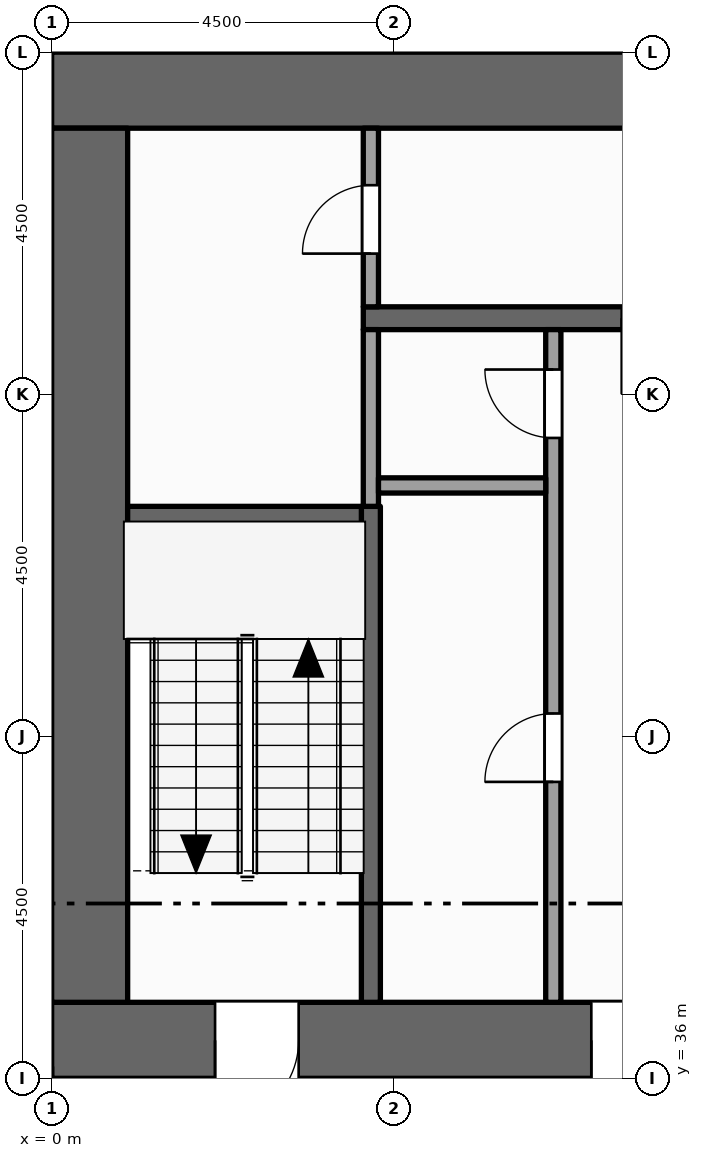
"""IFC4 building model, lengths in metres.
Left out: names, types, materials, properties, quantities, classifications, styles, units other than length and angle.
Written with IfcOpenShell. Run it as: python <this file> out.ifc"""

import sys

from ifc_helpers import new_model, si_unit, direction, frame, frame_2d, origin, place, context, subcontext, project, spatial, rectangle, extrude, element, fill, save


model = new_model("IFC4")
c1 = context("Model", 3, precision=1e-05, world=origin(), true_north=direction((0.0, 1.0)))
c2 = subcontext(c1, "Body", "Model", "MODEL_VIEW")
j1 = project(units=[si_unit("LENGTHUNIT", "METRE"), si_unit("PLANEANGLEUNIT", "RADIAN")], contexts=[c1])
p1 = place(None, origin())
s1 = spatial("IfcSite", under=j1, at=p1, CompositionType="ELEMENT")
p2 = place(p1, origin())
s2 = spatial("IfcBuilding", under=s1, at=p2, CompositionType="ELEMENT")
p3 = place(p2, frame((0.0, 0.0, 183.0)))
s3 = spatial("IfcBuildingStorey", under=s2, at=p3, CompositionType="ELEMENT", Elevation=183.0)
p4 = place(p3, frame((0.0, 36.5, -0.15), z_axis=(0.0, 0.0, 1.0), x_axis=(1.0, 0.0, 0.0)))
e1 = element("IfcWall", 1, at=p4, inside=s3, PredefinedType="SHEAR", context=c2, shape_type="SweptSolid", body=[
    extrude(rectangle(XDim=22.5, YDim=1.0, at=frame_2d((11.25, 0.0))), origin(), (0.0, 0.0, 1.0), 4.0),
])
p5 = place(p4, frame((7.1, 0.0, 0.15)))
e2 = element("IfcOpeningElement", 2, at=p5, cuts=e1, PredefinedType="OPENING", context=c2, shape_type="SweptSolid", body=[
    extrude(rectangle(XDim=1.8, YDim=2.1, at=frame_2d((0.9, 1.05))), frame((0.0, 0.51, 0.0), z_axis=(0.0, -1.0, 0.0), x_axis=(1.0, 0.0, 0.0)), (0.0, 0.0, 1.0), 1.02),
])
p6 = place(p4, frame((13.15, 0.0, 0.15)))
e3 = element("IfcOpeningElement", 3, at=p6, cuts=e1, PredefinedType="OPENING", context=c2, shape_type="SweptSolid", body=[
    extrude(rectangle(XDim=1.1, YDim=2.1, at=frame_2d((0.55, 1.05))), frame((0.0, 0.51, 0.0), z_axis=(0.0, -1.0, 0.0), x_axis=(1.0, 0.0, 0.0)), (0.0, 0.0, 1.0), 1.02),
])
p7 = place(p4, frame((2.15, 0.0, 0.15)))
e4 = element("IfcOpeningElement", 4, at=p7, cuts=e1, PredefinedType="OPENING", context=c2, shape_type="SweptSolid", body=[
    extrude(rectangle(XDim=1.1, YDim=2.1, at=frame_2d((0.55, 1.05))), frame((0.0, 0.51, 0.0), z_axis=(0.0, -1.0, 0.0), x_axis=(1.0, 0.0, 0.0)), (0.0, 0.0, 1.0), 1.02),
])
p8 = place(p4, frame((19.35, 0.0, 0.15)))
e5 = element("IfcOpeningElement", 5, at=p8, cuts=e1, PredefinedType="OPENING", context=c2, shape_type="SweptSolid", body=[
    extrude(rectangle(XDim=1.1, YDim=2.1, at=frame_2d((0.55, 1.05))), frame((0.0, 0.51, 0.0), z_axis=(0.0, -1.0, 0.0), x_axis=(1.0, 0.0, 0.0)), (0.0, 0.0, 1.0), 1.02),
])
p9 = place(p3, frame((0.0, 49.0, -0.15), z_axis=(0.0, 0.0, 1.0), x_axis=(1.0, 0.0, 0.0)))
e6 = element("IfcWall", 6, at=p9, inside=s3, PredefinedType="SHEAR", context=c2, shape_type="SweptSolid", body=[
    extrude(rectangle(XDim=22.5, YDim=1.0, at=frame_2d((11.25, 0.0))), origin(), (0.0, 0.0, 1.0), 4.0),
])
p10 = place(p3, frame((0.5, 37.0, -0.15), z_axis=(0.0, 0.0, 1.0), x_axis=(0.0, 1.0, 0.0)))
e7 = element("IfcWall", 7, at=p10, inside=s3, PredefinedType="SHEAR", context=c2, shape_type="SweptSolid", body=[
    extrude(rectangle(XDim=11.5, YDim=1.0, at=frame_2d((5.75, 0.0))), origin(), (0.0, 0.0, 1.0), 4.0),
])
p11 = place(p3, frame((0.0, 36.0, 0.0), z_axis=(0.0, 0.0, 1.0), x_axis=(-1.0, 0.0, 0.0)))
e8 = element("IfcWall", 8, at=p11, inside=s3, PredefinedType="STANDARD", context=c2, shape_type="SweptSolid", body=[
    extrude(rectangle(XDim=1.05, YDim=0.3, at=frame_2d((0.525, 0.0))), origin(), (0.0, 0.0, 1.0), 3.049),
])
p12 = place(p3, frame((4.2, 37.0, 0.0), z_axis=(0.0, 0.0, 1.0), x_axis=(0.0, 1.0, 0.0)))
e9 = element("IfcWall", 9, at=p12, inside=s3, PredefinedType="SHEAR", context=c2, shape_type="SweptSolid", body=[
    extrude(rectangle(XDim=6.525, YDim=0.25, at=frame_2d((3.262, 0.0))), origin(), (0.0, 0.0, 1.0), 3.75),
])
p13 = place(p3, frame((4.2, 43.525, 0.0), z_axis=(0.0, 0.0, 1.0), x_axis=(0.0, 1.0, 0.0)))
e10 = element("IfcWall", 10, at=p13, inside=s3, PredefinedType="PARTITIONING", context=c2, shape_type="SweptSolid", body=[
    extrude(rectangle(XDim=2.325, YDim=0.2, at=frame_2d((1.163, 0.0))), origin(), (0.0, 0.0, 1.0), 3.75),
])
p14 = place(p3, frame((4.2, 46.15, 0.0), z_axis=(0.0, 0.0, 1.0), x_axis=(0.0, 1.0, 0.0)))
e11 = element("IfcWall", 11, at=p14, inside=s3, PredefinedType="PARTITIONING", context=c2, shape_type="SweptSolid", body=[
    extrude(rectangle(XDim=2.35, YDim=0.2, at=frame_2d((1.175, 0.0))), origin(), (0.0, 0.0, 1.0), 3.75),
])
p15 = place(p14, frame((0.7, 0.0, 0.0)))
e12 = element("IfcOpeningElement", 12, at=p15, cuts=e11, PredefinedType="OPENING", context=c2, shape_type="SweptSolid", body=[
    extrude(rectangle(XDim=0.9, YDim=2.1, at=frame_2d((0.45, 1.05))), frame((0.0, 0.11, 0.0), z_axis=(0.0, -1.0, 0.0), x_axis=(1.0, 0.0, 0.0)), (0.0, 0.0, 1.0), 0.22),
])
p16 = place(p3, frame((6.6, 37.0, 0.0), z_axis=(0.0, 0.0, 1.0), x_axis=(0.0, 1.0, 0.0)))
e13 = element("IfcWall", 13, at=p16, inside=s3, PredefinedType="PARTITIONING", context=c2, shape_type="SweptSolid", body=[
    extrude(rectangle(XDim=8.85, YDim=0.2, at=frame_2d((4.425, 0.0))), origin(), (0.0, 0.0, 1.0), 3.75),
])
p17 = place(p16, frame((2.9, 0.0, 0.0)))
e14 = element("IfcOpeningElement", 14, at=p17, cuts=e13, PredefinedType="OPENING", context=c2, shape_type="SweptSolid", body=[
    extrude(rectangle(XDim=0.9, YDim=2.1, at=frame_2d((0.45, 1.05))), frame((0.0, 0.11, 0.0), z_axis=(0.0, -1.0, 0.0), x_axis=(1.0, 0.0, 0.0)), (0.0, 0.0, 1.0), 0.22),
])
p18 = place(p16, frame((7.425, 0.0, 0.0)))
e15 = element("IfcOpeningElement", 15, at=p18, cuts=e13, PredefinedType="OPENING", context=c2, shape_type="SweptSolid", body=[
    extrude(rectangle(XDim=0.9, YDim=2.1, at=frame_2d((0.45, 1.05))), frame((0.0, 0.11, 0.0), z_axis=(0.0, -1.0, 0.0), x_axis=(1.0, 0.0, 0.0)), (0.0, 0.0, 1.0), 0.22),
])
p19 = place(p3, frame((1.0, 43.4, 0.0), z_axis=(0.0, 0.0, 1.0), x_axis=(1.0, 0.0, 0.0)))
e16 = element("IfcWall", 16, at=p19, inside=s3, PredefinedType="SHEAR", context=c2, shape_type="SweptSolid", body=[
    extrude(rectangle(XDim=3.075, YDim=0.25, at=frame_2d((1.538, 0.0))), origin(), (0.0, 0.0, 1.0), 3.75),
])
p20 = place(p3, frame((4.3, 43.8, 0.0), z_axis=(0.0, 0.0, 1.0), x_axis=(1.0, 0.0, 0.0)))
e17 = element("IfcWall", 17, at=p20, inside=s3, PredefinedType="PARTITIONING", context=c2, shape_type="SweptSolid", body=[
    extrude(rectangle(XDim=2.2, YDim=0.2, at=frame_2d((1.1, 0.0))), origin(), (0.0, 0.0, 1.0), 3.75),
])
p21 = place(p3, frame((4.1, 46.0, 0.0), z_axis=(0.0, 0.0, 1.0), x_axis=(1.0, 0.0, 0.0)))
e18 = element("IfcWall", 18, at=p21, inside=s3, PredefinedType="SHEAR", context=c2, shape_type="SweptSolid", body=[
    extrude(rectangle(XDim=14.5, YDim=0.3, at=frame_2d((7.25, 0.0))), origin(), (0.0, 0.0, 1.0), 3.75),
])
p22 = place(p21, frame((3.4, 0.0, 0.0)))
e19 = element("IfcOpeningElement", 19, at=p22, cuts=e18, PredefinedType="OPENING", context=c2, shape_type="SweptSolid", body=[
    extrude(rectangle(XDim=1.0, YDim=2.1, at=frame_2d((0.5, 1.05))), frame((0.0, 0.16, 0.0), z_axis=(0.0, -1.0, 0.0), x_axis=(1.0, 0.0, 0.0)), (0.0, 0.0, 1.0), 0.32),
])
p23 = place(p21, frame((9.1, 0.0, 0.0)))
e20 = element("IfcOpeningElement", 20, at=p23, cuts=e18, PredefinedType="OPENING", context=c2, shape_type="SweptSolid", body=[
    extrude(rectangle(XDim=1.0, YDim=2.1, at=frame_2d((0.5, 1.05))), frame((0.0, 0.16, 0.0), z_axis=(0.0, -1.0, 0.0), x_axis=(1.0, 0.0, 0.0)), (0.0, 0.0, 1.0), 0.32),
])
p24 = place(p5, origin())
e21 = element("IfcDoor", 21, at=p24, inside=s3, OperationType="DOUBLE_DOOR_SINGLE_SWING", PredefinedType="DOOR", context=c2, shape_type="SweptSolid", body=[
    extrude(rectangle(XDim=1.8, YDim=2.1, at=frame_2d((0.9, 1.05))), frame((0.0, 0.025, 0.0), z_axis=(0.0, -1.0, 0.0), x_axis=(1.0, 0.0, 0.0)), (0.0, 0.0, 1.0), 0.05),
])
fill(e2, e21)
p25 = place(p7, origin())
e22 = element("IfcDoor", 22, at=p25, inside=s3, OperationType="SINGLE_SWING_LEFT", PredefinedType="DOOR", context=c2, shape_type="SweptSolid", body=[
    extrude(rectangle(XDim=1.1, YDim=2.1, at=frame_2d((0.55, 1.05))), frame((0.0, 0.025, 0.0), z_axis=(0.0, -1.0, 0.0), x_axis=(1.0, 0.0, 0.0)), (0.0, 0.0, 1.0), 0.05),
])
fill(e4, e22)
p26 = place(p15, origin())
e23 = element("IfcDoor", 23, at=p26, inside=s3, OperationType="SINGLE_SWING_LEFT", PredefinedType="DOOR", context=c2, shape_type="SweptSolid", body=[
    extrude(rectangle(XDim=0.9, YDim=2.1, at=frame_2d((0.45, 1.05))), frame((0.0, 0.025, 0.0), z_axis=(0.0, -1.0, 0.0), x_axis=(1.0, 0.0, 0.0)), (0.0, 0.0, 1.0), 0.05),
])
fill(e12, e23)
p27 = place(p17, origin())
e24 = element("IfcDoor", 24, at=p27, inside=s3, OperationType="SINGLE_SWING_LEFT", PredefinedType="DOOR", context=c2, shape_type="SweptSolid", body=[
    extrude(rectangle(XDim=0.9, YDim=2.1, at=frame_2d((0.45, 1.05))), frame((0.0, 0.025, 0.0), z_axis=(0.0, -1.0, 0.0), x_axis=(1.0, 0.0, 0.0)), (0.0, 0.0, 1.0), 0.05),
])
fill(e14, e24)
p28 = place(p18, origin())
e25 = element("IfcDoor", 25, at=p28, inside=s3, OperationType="SINGLE_SWING_RIGHT", PredefinedType="DOOR", context=c2, shape_type="SweptSolid", body=[
    extrude(rectangle(XDim=0.9, YDim=2.1, at=frame_2d((0.45, 1.05))), frame((0.0, 0.025, 0.0), z_axis=(0.0, -1.0, 0.0), x_axis=(1.0, 0.0, 0.0)), (0.0, 0.0, 1.0), 0.05),
])
fill(e15, e25)
save(model, sys.argv[1])
